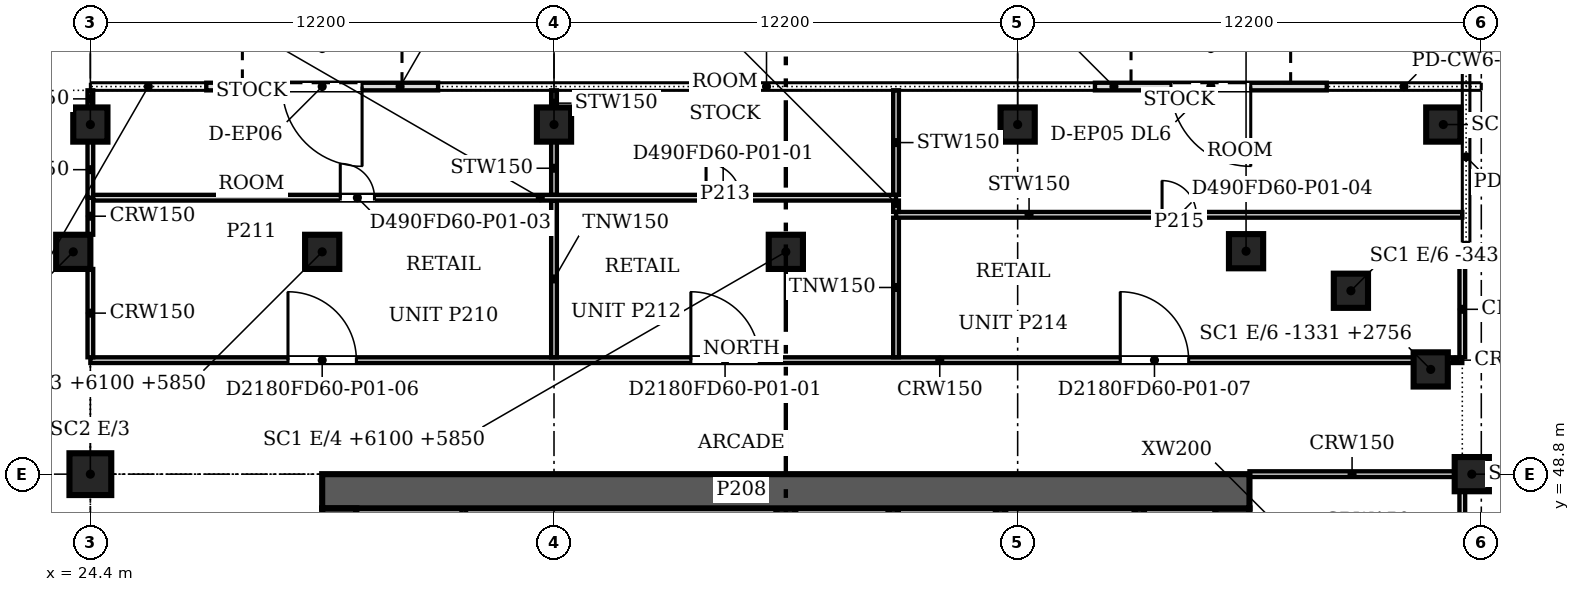
"""IFC4 building model, lengths in metres.
Left out: names, types, materials, properties, quantities, classifications, styles, units other than length and angle.
Written with IfcOpenShell. Run it as: python <this file> out.ifc"""

import sys

from ifc_helpers import new_model, si_unit, direction, frame, frame_2d, origin, origin_2d, place, context, subcontext, project, spatial, polyline, rectangle, outline, extrude, source, transform, mapped, element, fill, save


model = new_model("IFC4")
c1 = context("Model", 3, precision=1e-05, world=origin(), true_north=direction((0.0, 1.0)))
c2 = subcontext(c1, "Body", "Model", "MODEL_VIEW")
j1 = project(units=[si_unit("LENGTHUNIT", "METRE"), si_unit("PLANEANGLEUNIT", "RADIAN")], contexts=[c1])
p1 = place(None, origin())
s1 = spatial("IfcSite", under=j1, at=p1, CompositionType="ELEMENT")
p2 = place(p1, origin())
s2 = spatial("IfcBuilding", under=s1, at=p2, CompositionType="ELEMENT")
p3 = place(p2, origin())
s3 = spatial("IfcBuildingStorey", under=s2, at=p3, CompositionType="ELEMENT", Elevation=0.0)
p4 = place(p3, frame((23.95, 54.65, 0.0), z_axis=(0.0, 0.0, 1.0), x_axis=(1.0, 0.0, 0.0)))
e1 = element("IfcColumn", 1, at=p4, inside=s3, PredefinedType="COLUMN", context=c2, shape_type="SweptSolid", body=[
    extrude(rectangle(XDim=0.9, YDim=0.9, at=origin_2d()), origin(), (0.0, 0.0, 1.0), 7.2),
])
for number, where, z_axis, x_axis in (
    (2, (60.75, 48.8, 0.0), (0.0, 0.0, 1.0), (1.0, 0.0, 0.0)),
    (3, (59.669, 51.556, 0.0), (0.0, 0.0, 1.0), (1.0, 0.0, 0.0)),
    (4, (57.569, 53.626, 0.0), (0.0, 0.0, 1.0), (1.0, 0.0, 0.0)),
    (5, (54.81, 54.667, 0.0), (0.0, 0.0, 1.0), (1.0, 0.0, 0.0)),
    (6, (42.7, 54.65, 0.0), (0.0, 0.0, 1.0), (1.0, 0.0, 0.0)),
    (7, (30.5, 54.65, 0.0), (0.0, 0.0, 1.0), (1.0, 0.0, 0.0)),
):
    element("IfcColumn", number, at=place(p3, frame(where, z_axis=z_axis, x_axis=x_axis)), inside=s3, PredefinedType="COLUMN", context=c2, shape_type="SweptSolid", body=[
        extrude(rectangle(XDim=0.9, YDim=0.9, at=origin_2d()), origin(), (0.0, 0.0, 1.0), 6.95),
    ])
p5 = place(p3, frame((24.4, 48.8, 0.0), z_axis=(0.0, 0.0, 1.0), x_axis=(1.0, 0.0, 0.0)))
e8 = element("IfcColumn", 8, at=p5, inside=s3, PredefinedType="COLUMN", context=c2, shape_type="SweptSolid", body=[
    extrude(rectangle(XDim=1.1, YDim=1.1, at=origin_2d()), origin(), (0.0, 0.0, 1.0), 6.95),
])
for number, where, z_axis, x_axis in (
    (9, (24.4, 58.0, 0.0), (0.0, 0.0, 1.0), (1.0, 0.0, 0.0)),
    (10, (36.6, 58.0, 0.0), (0.0, 0.0, 1.0), (1.0, 0.0, 0.0)),
    (11, (48.8, 58.0, 0.0), (0.0, 0.0, 1.0), (1.0, 0.0, 0.0)),
    (12, (61.0, 54.2, 0.0), (0.0, 0.0, 1.0), (1.0, 0.0, 0.0)),
    (13, (60.0, 58.0, 0.0), (0.0, 0.0, 1.0), (1.0, 0.0, 0.0)),
):
    element("IfcColumn", number, at=place(p3, frame(where, z_axis=z_axis, x_axis=x_axis)), inside=s3, PredefinedType="COLUMN", context=c2, shape_type="SweptSolid", body=[
        extrude(rectangle(XDim=0.9, YDim=0.9, at=origin_2d()), origin(), (0.0, 0.0, 1.0), 6.95),
    ])
p6 = place(p3, frame((56.933, 59.0, 0.0), z_axis=(0.0, 0.0, 1.0), x_axis=(-1.0, 0.0, 0.0)))
e14 = element("IfcWall", 14, at=p6, inside=s3, PredefinedType="PARTITIONING", context=c2, shape_type="SweptSolid", body=[
    extrude(rectangle(XDim=6.1, YDim=0.2, at=frame_2d((3.05, 0.0))), origin(), (0.0, 0.0, 1.0), 6.95),
])
m1 = source(origin(), c2, "Body", "SweptSolid", [
    extrude(rectangle(XDim=2.1, YDim=3.0, at=frame_2d((1.05, 1.5))), frame((0.0, 0.11, 0.0), z_axis=(0.0, -1.0, 0.0), x_axis=(1.0, 0.0, 0.0)), (0.0, 0.0, 1.0), 0.22),
])
p7 = place(p6, frame((2.0, 0.0, 0.0)))
e15 = element("IfcOpeningElement", 15, at=p7, cuts=e14, PredefinedType="OPENING", context=c2, shape_type="MappedRepresentation", body=[
    mapped(m1, transform((0.0, 0.0, 0.0), scale=1.0)),
])
m2 = source(origin(), c2, "Body", "SweptSolid", [
    extrude(outline(polyline([(0.12, 0.1), (1.88, 0.1), (1.88, 6.85), (0.12, 6.85), (0.12, 0.1)])), frame((0.0, 0.11, 0.0), z_axis=(0.0, -1.0, 0.0), x_axis=(1.0, 0.0, 0.0)), (0.0, 0.0, 1.0), 0.22),
])
p8 = place(p6, origin())
e16 = element("IfcOpeningElement", 16, at=p8, cuts=e14, PredefinedType="OPENING", context=c2, shape_type="MappedRepresentation", body=[
    mapped(m2, transform((0.0, 0.0, 0.0), scale=1.0)),
])
m3 = source(origin(), c2, "Body", "SweptSolid", [
    extrude(outline(polyline([(4.22, 0.1), (5.98, 0.1), (5.98, 6.85), (4.22, 6.85), (4.22, 0.1)])), frame((0.0, 0.11, 0.0), z_axis=(0.0, -1.0, 0.0), x_axis=(1.0, 0.0, 0.0)), (0.0, 0.0, 1.0), 0.22),
])
p9 = place(p6, origin())
e17 = element("IfcOpeningElement", 17, at=p9, cuts=e14, PredefinedType="OPENING", context=c2, shape_type="MappedRepresentation", body=[
    mapped(m3, transform((0.0, 0.0, 0.0), scale=1.0)),
])
m4 = source(origin(), c2, "Body", "SweptSolid", [
    extrude(outline(polyline([(2.0, 3.12), (4.1, 3.12), (4.1, 6.85), (2.0, 6.85), (2.0, 3.12)])), frame((0.0, 0.11, 0.0), z_axis=(0.0, -1.0, 0.0), x_axis=(1.0, 0.0, 0.0)), (0.0, 0.0, 1.0), 0.22),
])
p10 = place(p6, origin())
e18 = element("IfcOpeningElement", 18, at=p10, cuts=e14, PredefinedType="OPENING", context=c2, shape_type="MappedRepresentation", body=[
    mapped(m4, transform((0.0, 0.0, 0.0), scale=1.0)),
])
p11 = place(p3, frame((33.55, 59.0, 0.0), z_axis=(0.0, 0.0, 1.0), x_axis=(-1.0, 0.0, 0.0)))
e19 = element("IfcWall", 19, at=p11, inside=s3, PredefinedType="PARTITIONING", context=c2, shape_type="SweptSolid", body=[
    extrude(rectangle(XDim=6.1, YDim=0.2, at=frame_2d((3.05, 0.0))), origin(), (0.0, 0.0, 1.0), 6.95),
])
p12 = place(p11, frame((2.0, 0.0, 0.0)))
e20 = element("IfcOpeningElement", 20, at=p12, cuts=e19, PredefinedType="OPENING", context=c2, shape_type="MappedRepresentation", body=[
    mapped(m1, transform((0.0, 0.0, 0.0), scale=1.0)),
])
p13 = place(p11, origin())
e21 = element("IfcOpeningElement", 21, at=p13, cuts=e19, PredefinedType="OPENING", context=c2, shape_type="MappedRepresentation", body=[
    mapped(m2, transform((0.0, 0.0, 0.0), scale=1.0)),
])
p14 = place(p11, origin())
e22 = element("IfcOpeningElement", 22, at=p14, cuts=e19, PredefinedType="OPENING", context=c2, shape_type="MappedRepresentation", body=[
    mapped(m3, transform((0.0, 0.0, 0.0), scale=1.0)),
])
p15 = place(p11, origin())
e23 = element("IfcOpeningElement", 23, at=p15, cuts=e19, PredefinedType="OPENING", context=c2, shape_type="MappedRepresentation", body=[
    mapped(m4, transform((0.0, 0.0, 0.0), scale=1.0)),
])
p16 = place(p3, frame((30.95, 25.3, 0.0), z_axis=(0.0, 0.0, 1.0), x_axis=(0.0, 1.0, 0.0)))
e24 = element("IfcWall", 24, at=p16, inside=s3, PredefinedType="SHEAR", context=c2, shape_type="SweptSolid", body=[
    extrude(rectangle(XDim=22.6, YDim=0.9, at=frame_2d((11.3, 0.0))), origin(), (0.0, 0.0, 1.0), 7.2),
])
m5 = source(origin(), c2, "Body", "SweptSolid", [
    extrude(rectangle(XDim=2.1, YDim=2.4, at=frame_2d((1.05, 1.2))), frame((0.0, 0.46, 0.0), z_axis=(0.0, -1.0, 0.0), x_axis=(1.0, 0.0, 0.0)), (0.0, 0.0, 1.0), 0.92),
])
p17 = place(p16, frame((4.5, 0.0, 0.0)))
e25 = element("IfcOpeningElement", 25, at=p17, cuts=e24, PredefinedType="OPENING", context=c2, shape_type="MappedRepresentation", body=[
    mapped(m5, transform((0.0, 0.0, 0.0), scale=1.0)),
])
p18 = place(p16, frame((16.0, 0.0, 0.0)))
e26 = element("IfcOpeningElement", 26, at=p18, cuts=e24, PredefinedType="OPENING", context=c2, shape_type="MappedRepresentation", body=[
    mapped(m5, transform((0.0, 0.0, 0.0), scale=1.0)),
])
p19 = place(p3, frame((30.5, 48.35, 0.0), z_axis=(0.0, 0.0, 1.0), x_axis=(1.0, 0.0, 0.0)))
e27 = element("IfcWall", 27, at=p19, inside=s3, PredefinedType="SHEAR", context=c2, shape_type="SweptSolid", body=[
    extrude(rectangle(XDim=24.4, YDim=0.9, at=frame_2d((12.2, 0.0))), origin(), (0.0, 0.0, 1.0), 7.2),
])
p20 = place(p3, frame((54.45, 47.9, 0.0), z_axis=(0.0, 0.0, 1.0), x_axis=(0.0, -1.0, 0.0)))
e28 = element("IfcWall", 28, at=p20, inside=s3, PredefinedType="SHEAR", context=c2, shape_type="SweptSolid", body=[
    extrude(rectangle(XDim=22.6, YDim=0.9, at=frame_2d((11.3, 0.0))), origin(), (0.0, 0.0, 1.0), 7.2),
])
m6 = source(origin(), c2, "Body", "SweptSolid", [
    extrude(rectangle(XDim=2.4, YDim=2.1, at=frame_2d((1.2, 1.05))), frame((0.0, 0.46, 0.0), z_axis=(0.0, -1.0, 0.0), x_axis=(1.0, 0.0, 0.0)), (0.0, 0.0, 1.0), 0.92),
])
p21 = place(p20, frame((4.0, 0.0, 0.0)))
e29 = element("IfcOpeningElement", 29, at=p21, cuts=e28, PredefinedType="OPENING", context=c2, shape_type="MappedRepresentation", body=[
    mapped(m6, transform((0.0, 0.0, 0.0), scale=1.0)),
])
p22 = place(p3, frame((42.7, 44.9, 0.0), z_axis=(0.0, 0.0, 1.0), x_axis=(0.0, 1.0, 0.0)))
e30 = element("IfcWall", 30, at=p22, inside=s3, PredefinedType="SHEAR", context=c2, shape_type="SweptSolid", body=[
    extrude(rectangle(XDim=3.0, YDim=0.5, at=frame_2d((1.5, 0.0))), origin(), (0.0, 0.0, 1.0), 7.2),
])
p23 = place(p3, frame((48.35, 47.9, 0.0), z_axis=(0.0, 0.0, 1.0), x_axis=(0.0, -1.0, 0.0)))
e31 = element("IfcWall", 31, at=p23, inside=s3, PredefinedType="SOLIDWALL", context=c2, shape_type="SweptSolid", body=[
    extrude(rectangle(XDim=11.05, YDim=0.25, at=frame_2d((5.525, 0.0))), origin(), (0.0, 0.0, 1.0), 7.2),
])
m7 = source(origin(), c2, "Body", "SweptSolid", [
    extrude(rectangle(XDim=1.2, YDim=2.1, at=frame_2d((0.6, 1.05))), frame((0.0, 0.135, 0.0), z_axis=(0.0, -1.0, 0.0), x_axis=(1.0, 0.0, 0.0)), (0.0, 0.0, 1.0), 0.27),
])
p24 = place(p23, frame((6.625, 0.0, 0.0)))
e32 = element("IfcOpeningElement", 32, at=p24, cuts=e31, PredefinedType="OPENING", context=c2, shape_type="MappedRepresentation", body=[
    mapped(m7, transform((0.0, 0.0, 0.0), scale=1.0)),
])
p25 = place(p3, frame((52.0, 25.3, 0.0), z_axis=(0.0, 0.0, 1.0), x_axis=(0.0, 1.0, 0.0)))
e33 = element("IfcWall", 33, at=p25, inside=s3, PredefinedType="SOLIDWALL", context=c2, shape_type="SweptSolid", body=[
    extrude(rectangle(XDim=22.6, YDim=0.25, at=frame_2d((11.3, 0.0))), origin(), (0.0, 0.0, 1.0), 7.2),
])
p26 = place(p25, frame((6.625, 0.0, 0.0)))
e34 = element("IfcOpeningElement", 34, at=p26, cuts=e33, PredefinedType="OPENING", context=c2, shape_type="MappedRepresentation", body=[
    mapped(m7, transform((0.0, 0.0, 0.0), scale=1.0)),
])
m8 = source(origin(), c2, "Body", "SweptSolid", [
    extrude(rectangle(XDim=0.9, YDim=2.1, at=frame_2d((0.45, 1.05))), frame((0.0, 0.135, 0.0), z_axis=(0.0, -1.0, 0.0), x_axis=(1.0, 0.0, 0.0)), (0.0, 0.0, 1.0), 0.27),
])
p27 = place(p25, frame((9.25, 0.0, 0.0)))
e35 = element("IfcOpeningElement", 35, at=p27, cuts=e33, PredefinedType="OPENING", context=c2, shape_type="MappedRepresentation", body=[
    mapped(m8, transform((0.0, 0.0, 0.0), scale=1.0)),
])
p28 = place(p25, frame((12.55, 0.0, 0.0)))
e36 = element("IfcOpeningElement", 36, at=p28, cuts=e33, PredefinedType="OPENING", context=c2, shape_type="MappedRepresentation", body=[
    mapped(m8, transform((0.0, 0.0, 0.0), scale=1.0)),
])
p29 = place(p25, frame((14.775, 0.0, 0.0)))
e37 = element("IfcOpeningElement", 37, at=p29, cuts=e33, PredefinedType="OPENING", context=c2, shape_type="MappedRepresentation", body=[
    mapped(m7, transform((0.0, 0.0, 0.0), scale=1.0)),
])
p30 = place(p3, frame((45.525, 44.9, 0.0), z_axis=(0.0, 0.0, 1.0), x_axis=(0.0, 1.0, 0.0)))
e38 = element("IfcWall", 38, at=p30, inside=s3, PredefinedType="SOLIDWALL", context=c2, shape_type="SweptSolid", body=[
    extrude(rectangle(XDim=3.0, YDim=0.25, at=frame_2d((1.5, 0.0))), origin(), (0.0, 0.0, 1.0), 7.2),
])
p31 = place(p3, frame((34.225, 44.96, 0.0), z_axis=(0.0, 0.0, 1.0), x_axis=(0.0, 1.0, 0.0)))
e39 = element("IfcWall", 39, at=p31, inside=s3, PredefinedType="PARTITIONING", context=c2, shape_type="SweptSolid", body=[
    extrude(rectangle(XDim=2.94, YDim=0.12, at=frame_2d((1.47, 0.0))), origin(), (0.0, 0.0, 1.0), 6.95),
])
p32 = place(p3, frame((60.5, 44.1, 0.0), z_axis=(0.0, 0.0, 1.0), x_axis=(0.0, 1.0, 0.0)))
e40 = element("IfcWall", 40, at=p32, inside=s3, PredefinedType="PARTITIONING", context=c2, shape_type="SweptSolid", body=[
    extrude(rectangle(XDim=4.249, YDim=0.15, at=frame_2d((2.125, 0.0))), origin(), (0.0, 0.0, 1.0), 6.115),
])
m9 = source(origin(), c2, "Body", "SweptSolid", [
    extrude(rectangle(XDim=0.9, YDim=2.1, at=frame_2d((0.45, 1.05))), frame((0.0, 0.085, 0.0), z_axis=(0.0, -1.0, 0.0), x_axis=(1.0, 0.0, 0.0)), (0.0, 0.0, 1.0), 0.17),
])
p33 = place(p32, frame((1.7, 0.0, 0.0)))
e41 = element("IfcOpeningElement", 41, at=p33, cuts=e40, PredefinedType="OPENING", context=c2, shape_type="MappedRepresentation", body=[
    mapped(m9, transform((0.0, 0.0, 0.0), scale=1.0)),
])
p34 = place(p3, frame((54.9, 48.8, 0.0), z_axis=(0.0, 0.0, 1.0), x_axis=(1.0, 0.0, 0.0)))
e42 = element("IfcWall", 42, at=p34, inside=s3, PredefinedType="PARTITIONING", context=c2, shape_type="SweptSolid", body=[
    extrude(rectangle(XDim=5.399, YDim=0.15, at=frame_2d((2.7, 0.0))), origin(), (0.0, 0.0, 1.0), 6.115),
])
p35 = place(p3, frame((24.4, 51.8, 0.0), z_axis=(0.0, 0.0, 1.0), x_axis=(1.0, 0.0, 0.0)))
e43 = element("IfcWall", 43, at=p35, inside=s3, PredefinedType="PARTITIONING", context=c2, shape_type="SweptSolid", body=[
    extrude(rectangle(XDim=34.818, YDim=0.15, at=frame_2d((17.409, 0.0))), origin(), (0.0, 0.0, 1.0), 6.115),
])
m10 = source(origin(), c2, "Body", "SweptSolid", [
    extrude(rectangle(XDim=1.8, YDim=2.1, at=frame_2d((0.9, 1.05))), frame((0.0, 0.085, 0.0), z_axis=(0.0, -1.0, 0.0), x_axis=(1.0, 0.0, 0.0)), (0.0, 0.0, 1.0), 0.17),
])
p36 = place(p35, frame((15.801, 0.0, 0.0)))
e44 = element("IfcOpeningElement", 44, at=p36, cuts=e43, PredefinedType="OPENING", context=c2, shape_type="MappedRepresentation", body=[
    mapped(m10, transform((0.0, 0.0, 0.0), scale=1.0)),
])
p37 = place(p35, frame((5.2, 0.0, 0.0)))
e45 = element("IfcOpeningElement", 45, at=p37, cuts=e43, PredefinedType="OPENING", context=c2, shape_type="MappedRepresentation", body=[
    mapped(m10, transform((0.0, 0.0, 0.0), scale=1.0)),
])
p38 = place(p35, frame((27.1, 0.0, 0.0)))
e46 = element("IfcOpeningElement", 46, at=p38, cuts=e43, PredefinedType="OPENING", context=c2, shape_type="MappedRepresentation", body=[
    mapped(m10, transform((0.0, 0.0, 0.0), scale=1.0)),
])
p39 = place(p3, frame((60.12, 51.8, 0.0), z_axis=(0.0, 0.0, 1.0), x_axis=(1.0, 0.0, 0.0)))
e47 = element("IfcWall", 47, at=p39, inside=s3, PredefinedType="PARTITIONING", context=c2, shape_type="SweptSolid", body=[
    extrude(rectangle(XDim=0.38, YDim=0.15, at=frame_2d((0.19, 0.0))), origin(), (0.0, 0.0, 1.0), 6.115),
])
p40 = place(p3, frame((24.4, 51.876, 0.0), z_axis=(0.0, 0.0, 1.0), x_axis=(0.0, 1.0, 0.0)))
e48 = element("IfcWall", 48, at=p40, inside=s3, PredefinedType="PARTITIONING", context=c2, shape_type="SweptSolid", body=[
    extrude(rectangle(XDim=2.323, YDim=0.15, at=frame_2d((1.162, 0.0))), origin(), (0.0, 0.0, 1.0), 6.115),
])
p41 = place(p3, frame((36.6, 51.876, 0.0), z_axis=(0.0, 0.0, 1.0), x_axis=(0.0, 1.0, 0.0)))
e49 = element("IfcWall", 49, at=p41, inside=s3, PredefinedType="PARTITIONING", context=c2, shape_type="SweptSolid", body=[
    extrude(rectangle(XDim=4.123, YDim=0.15, at=frame_2d((2.062, 0.0))), origin(), (0.0, 0.0, 1.0), 6.115),
])
p42 = place(p3, frame((45.6, 51.876, 0.0), z_axis=(0.0, 0.0, 1.0), x_axis=(0.0, 1.0, 0.0)))
e50 = element("IfcWall", 50, at=p42, inside=s3, PredefinedType="PARTITIONING", context=c2, shape_type="SweptSolid", body=[
    extrude(rectangle(XDim=3.673, YDim=0.15, at=frame_2d((1.836, 0.0))), origin(), (0.0, 0.0, 1.0), 6.115),
])
p43 = place(p3, frame((60.5, 51.876, 0.0), z_axis=(0.0, 0.0, 1.0), x_axis=(0.0, 1.0, 0.0)))
e51 = element("IfcWall", 51, at=p43, inside=s3, PredefinedType="PARTITIONING", context=c2, shape_type="SweptSolid", body=[
    extrude(rectangle(XDim=2.524, YDim=0.15, at=frame_2d((1.262, 0.0))), origin(), (0.0, 0.0, 1.0), 6.115),
])
p44 = place(p3, frame((24.4, 55.101, 0.0), z_axis=(0.0, 0.0, 1.0), x_axis=(0.0, 1.0, 0.0)))
e52 = element("IfcWall", 52, at=p44, inside=s3, PredefinedType="PARTITIONING", context=c2, shape_type="SweptSolid", body=[
    extrude(rectangle(XDim=0.974, YDim=0.15, at=frame_2d((0.487, 0.0))), origin(), (0.0, 0.0, 1.0), 6.115),
])
p45 = place(p3, frame((45.6, 55.625, 0.0), z_axis=(0.0, 0.0, 1.0), x_axis=(1.0, 0.0, 0.0)))
e53 = element("IfcWall", 53, at=p45, inside=s3, PredefinedType="PARTITIONING", context=c2, shape_type="SweptSolid", body=[
    extrude(rectangle(XDim=14.9, YDim=0.15, at=frame_2d((7.45, 0.0))), origin(), (0.0, 0.0, 1.0), 6.115),
])
p46 = place(p45, frame((7.0, 0.0, 0.0)))
e54 = element("IfcOpeningElement", 54, at=p46, cuts=e53, PredefinedType="OPENING", context=c2, shape_type="MappedRepresentation", body=[
    mapped(m9, transform((0.0, 0.0, 0.0), scale=1.0)),
])
p47 = place(p3, frame((45.6, 55.701, 0.0), z_axis=(0.0, 0.0, 1.0), x_axis=(0.0, 1.0, 0.0)))
e55 = element("IfcWall", 55, at=p47, inside=s3, PredefinedType="PARTITIONING", context=c2, shape_type="SweptSolid", body=[
    extrude(rectangle(XDim=0.298, YDim=0.15, at=frame_2d((0.149, 0.0))), origin(), (0.0, 0.0, 1.0), 6.115),
])
p48 = place(p3, frame((24.4, 56.076, 0.0), z_axis=(0.0, 0.0, 1.0), x_axis=(0.0, 1.0, 0.0)))
e56 = element("IfcWall", 56, at=p48, inside=s3, PredefinedType="PARTITIONING", context=c2, shape_type="SweptSolid", body=[
    extrude(rectangle(XDim=1.473, YDim=0.15, at=frame_2d((0.737, 0.0))), origin(), (0.0, 0.0, 1.0), 6.115),
])
p49 = place(p3, frame((24.476, 56.075, 0.0), z_axis=(0.0, 0.0, 1.0), x_axis=(1.0, 0.0, 0.0)))
e57 = element("IfcWall", 57, at=p49, inside=s3, PredefinedType="PARTITIONING", context=c2, shape_type="SweptSolid", body=[
    extrude(rectangle(XDim=21.124, YDim=0.15, at=frame_2d((10.562, 0.0))), origin(), (0.0, 0.0, 1.0), 6.115),
])
p50 = place(p49, frame((16.125, 0.0, 0.0)))
e58 = element("IfcOpeningElement", 58, at=p50, cuts=e57, PredefinedType="OPENING", context=c2, shape_type="MappedRepresentation", body=[
    mapped(m9, transform((0.0, 0.0, 0.0), scale=1.0)),
])
p51 = place(p49, frame((6.5, 0.0, 0.0)))
e59 = element("IfcOpeningElement", 59, at=p51, cuts=e57, PredefinedType="OPENING", context=c2, shape_type="MappedRepresentation", body=[
    mapped(m9, transform((0.0, 0.0, 0.0), scale=1.0)),
])
p52 = place(p3, frame((36.6, 56.151, 0.0), z_axis=(0.0, 0.0, 1.0), x_axis=(0.0, 1.0, 0.0)))
e60 = element("IfcWall", 60, at=p52, inside=s3, PredefinedType="PARTITIONING", context=c2, shape_type="SweptSolid", body=[
    extrude(rectangle(XDim=1.398, YDim=0.15, at=frame_2d((0.699, 0.0))), origin(), (0.0, 0.0, 1.0), 6.115),
])
p53 = place(p3, frame((45.6, 56.151, 0.0), z_axis=(0.0, 0.0, 1.0), x_axis=(0.0, 1.0, 0.0)))
e61 = element("IfcWall", 61, at=p53, inside=s3, PredefinedType="PARTITIONING", context=c2, shape_type="SweptSolid", body=[
    extrude(rectangle(XDim=2.749, YDim=0.15, at=frame_2d((1.375, 0.0))), origin(), (0.0, 0.0, 1.0), 6.115),
])
for number, where, z_axis, x_axis in (
    (62, (24.4, 58.451, 0.0), (0.0, 0.0, 1.0), (0.0, 1.0, 0.0)),
    (63, (36.6, 58.451, 0.0), (0.0, 0.0, 1.0), (0.0, 1.0, 0.0)),
):
    element("IfcWall", number, at=place(p3, frame(where, z_axis=z_axis, x_axis=x_axis)), inside=s3, PredefinedType="PARTITIONING", context=c2, shape_type="SweptSolid", body=[
        extrude(rectangle(XDim=0.449, YDim=0.15, at=frame_2d((0.225, 0.0))), origin(), (0.0, 0.0, 1.0), 6.115),
    ])
m11 = source(origin(), c2, "Body", "SweptSolid", [
    extrude(rectangle(XDim=2.1, YDim=3.0, at=frame_2d((1.05, 1.5))), frame((0.0, 0.025, 0.0), z_axis=(0.0, -1.0, 0.0), x_axis=(1.0, 0.0, 0.0)), (0.0, 0.0, 1.0), 0.05),
])
p54 = place(p7, origin())
e64 = element("IfcDoor", 64, at=p54, inside=s3, OperationType="DOUBLE_DOOR_SINGLE_SWING", PredefinedType="DOOR", context=c2, shape_type="MappedRepresentation", body=[
    mapped(m11, transform((0.0, 0.0, 0.0), scale=1.0)),
])
fill(e15, e64)
p55 = place(p12, origin())
e65 = element("IfcDoor", 65, at=p55, inside=s3, OperationType="DOUBLE_DOOR_SINGLE_SWING", PredefinedType="DOOR", context=c2, shape_type="MappedRepresentation", body=[
    mapped(m11, transform((0.0, 0.0, 0.0), scale=1.0)),
])
fill(e20, e65)
m12 = source(origin(), c2, "Body", "SweptSolid", [
    extrude(rectangle(XDim=1.8, YDim=2.1, at=frame_2d((0.9, 1.05))), frame((0.0, 0.025, 0.0), z_axis=(0.0, -1.0, 0.0), x_axis=(1.0, 0.0, 0.0)), (0.0, 0.0, 1.0), 0.05),
])
p56 = place(p36, origin())
e66 = element("IfcDoor", 66, at=p56, inside=s3, OperationType="DOUBLE_DOOR_SINGLE_SWING", PredefinedType="DOOR", context=c2, shape_type="MappedRepresentation", body=[
    mapped(m12, transform((0.0, 0.0, 0.0), scale=1.0)),
])
fill(e44, e66)
m13 = source(origin(), c2, "Body", "SweptSolid", [
    extrude(rectangle(XDim=0.9, YDim=2.1, at=frame_2d((0.45, 1.05))), frame((0.0, 0.025, 0.0), z_axis=(0.0, -1.0, 0.0), x_axis=(1.0, 0.0, 0.0)), (0.0, 0.0, 1.0), 0.05),
])
p57 = place(p50, origin())
e67 = element("IfcDoor", 67, at=p57, inside=s3, OperationType="SINGLE_SWING_LEFT", PredefinedType="DOOR", context=c2, shape_type="MappedRepresentation", body=[
    mapped(m13, transform((0.0, 0.0, 0.0), scale=1.0)),
])
fill(e58, e67)
p58 = place(p51, origin())
e68 = element("IfcDoor", 68, at=p58, inside=s3, OperationType="SINGLE_SWING_LEFT", PredefinedType="DOOR", context=c2, shape_type="MappedRepresentation", body=[
    mapped(m13, transform((0.0, 0.0, 0.0), scale=1.0)),
])
fill(e59, e68)
p59 = place(p37, origin())
e69 = element("IfcDoor", 69, at=p59, inside=s3, OperationType="DOUBLE_DOOR_SINGLE_SWING", PredefinedType="DOOR", context=c2, shape_type="MappedRepresentation", body=[
    mapped(m12, transform((0.0, 0.0, 0.0), scale=1.0)),
])
fill(e45, e69)
p60 = place(p38, origin())
e70 = element("IfcDoor", 70, at=p60, inside=s3, OperationType="DOUBLE_DOOR_SINGLE_SWING", PredefinedType="DOOR", context=c2, shape_type="MappedRepresentation", body=[
    mapped(m12, transform((0.0, 0.0, 0.0), scale=1.0)),
])
fill(e46, e70)
p61 = place(p46, origin())
e71 = element("IfcDoor", 71, at=p61, inside=s3, OperationType="SINGLE_SWING_LEFT", PredefinedType="DOOR", context=c2, shape_type="MappedRepresentation", body=[
    mapped(m13, transform((0.0, 0.0, 0.0), scale=1.0)),
])
fill(e54, e71)
save(model, sys.argv[1])
